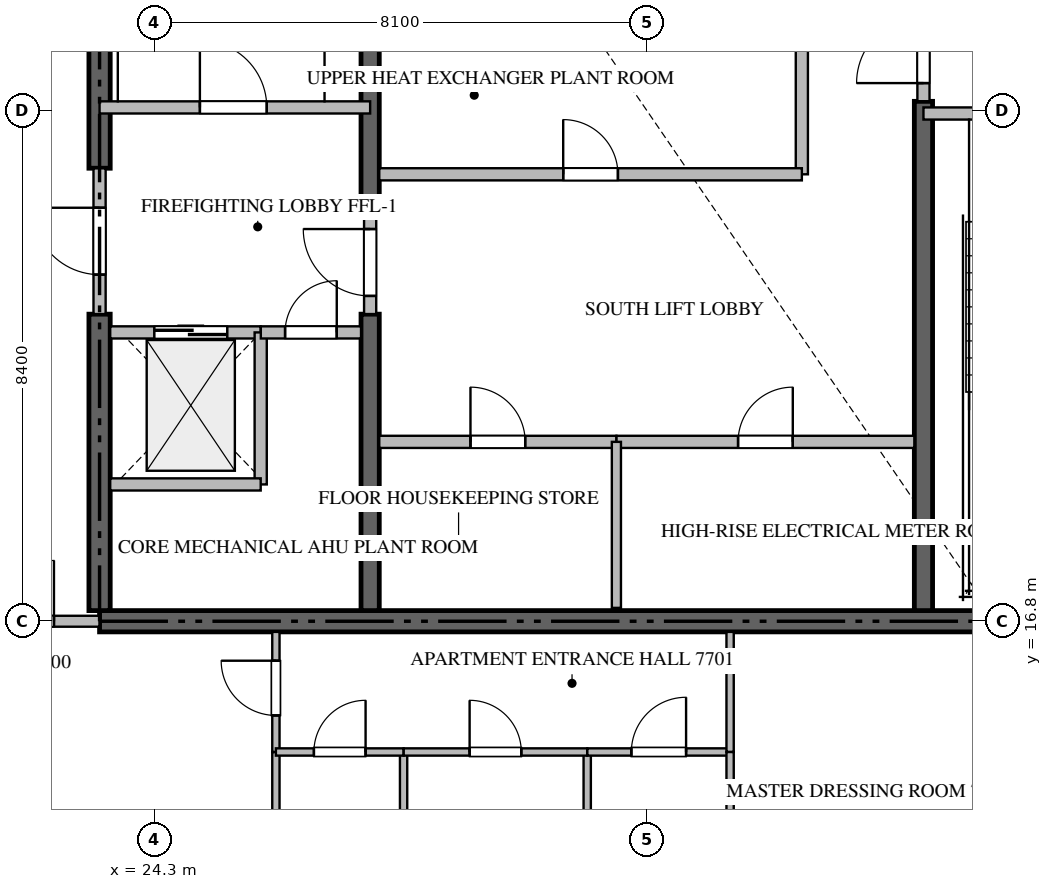
"""IFC4 building model, lengths in metres.
Left out: names, types, materials, properties, quantities, classifications, styles, units other than length and angle.
Written with IfcOpenShell. Run it as: python <this file> out.ifc"""

import sys

from ifc_helpers import new_model, si_unit, direction, frame, frame_2d, origin, place, context, subcontext, project, spatial, rectangle, extrude, source, transform, mapped, element, fill, save


model = new_model("IFC4")
c1 = context("Model", 3, precision=1e-05, world=origin(), true_north=direction((0.0, 1.0)))
c2 = subcontext(c1, "Body", "Model", "MODEL_VIEW")
j1 = project(units=[si_unit("LENGTHUNIT", "METRE"), si_unit("PLANEANGLEUNIT", "RADIAN")], contexts=[c1])
p1 = place(None, origin())
s1 = spatial("IfcSite", under=j1, at=p1, CompositionType="ELEMENT")
p2 = place(p1, origin())
s2 = spatial("IfcBuilding", under=s1, at=p2, CompositionType="ELEMENT")
p3 = place(p2, frame((0.0, 0.0, 309.65)))
s3 = spatial("IfcBuildingStorey", under=s2, at=p3, CompositionType="ELEMENT", Elevation=309.65)
p4 = place(p3, frame((23.4, 16.8, -0.26), z_axis=(0.0, 0.0, 1.0), x_axis=(1.0, 0.0, 0.0)))
e1 = element("IfcWall", 1, at=p4, inside=s3, PredefinedType="SHEAR", context=c2, shape_type="SweptSolid", body=[
    extrude(rectangle(XDim=18.0, YDim=0.35, at=frame_2d((9.0, 0.0))), origin(), (0.0, 0.0, 1.0), 4.048),
])
p5 = place(p3, frame((23.4, 16.975, -0.26), z_axis=(0.0, 0.0, 1.0), x_axis=(0.0, 1.0, 0.0)))
e2 = element("IfcWall", 2, at=p5, inside=s3, PredefinedType="SHEAR", context=c2, shape_type="SweptSolid", body=[
    extrude(rectangle(XDim=4.875, YDim=0.35, at=frame_2d((2.438, 0.0))), origin(), (0.0, 0.0, 1.0), 4.048),
])
p6 = place(p3, frame((23.4, 24.25, -0.26), z_axis=(0.0, 0.0, 1.0), x_axis=(0.0, 1.0, 0.0)))
e3 = element("IfcWall", 3, at=p6, inside=s3, PredefinedType="SHEAR", context=c2, shape_type="SweptSolid", body=[
    extrude(rectangle(XDim=9.175, YDim=0.35, at=frame_2d((4.587, 0.0))), origin(), (0.0, 0.0, 1.0), 4.048),
])
p7 = place(p3, frame((27.85, 16.975, -0.26), z_axis=(0.0, 0.0, 1.0), x_axis=(0.0, 1.0, 0.0)))
e4 = element("IfcWall", 4, at=p7, inside=s3, PredefinedType="SHEAR", context=c2, shape_type="SweptSolid", body=[
    extrude(rectangle(XDim=4.875, YDim=0.3, at=frame_2d((2.438, 0.0))), origin(), (0.0, 0.0, 1.0), 4.048),
])
p8 = place(p3, frame((27.85, 23.55, -0.26), z_axis=(0.0, 0.0, 1.0), x_axis=(0.0, 1.0, 0.0)))
e5 = element("IfcWall", 5, at=p8, inside=s3, PredefinedType="SHEAR", context=c2, shape_type="SweptSolid", body=[
    extrude(rectangle(XDim=9.875, YDim=0.3, at=frame_2d((4.938, 0.0))), origin(), (0.0, 0.0, 1.0), 4.048),
])
p9 = place(p3, frame((36.95, 16.975, -0.26), z_axis=(0.0, 0.0, 1.0), x_axis=(0.0, 1.0, 0.0)))
e6 = element("IfcWall", 6, at=p9, inside=s3, PredefinedType="SHEAR", context=c2, shape_type="SweptSolid", body=[
    extrude(rectangle(XDim=8.375, YDim=0.3, at=frame_2d((4.188, 0.0))), origin(), (0.0, 0.0, 1.0), 4.048),
])
p10 = place(p3, frame((23.4, 25.25, 0.0), z_axis=(0.0, 0.0, 1.0), x_axis=(1.0, 0.0, 0.0)))
e7 = element("IfcWall", 7, at=p10, inside=s3, PredefinedType="STANDARD", context=c2, shape_type="SweptSolid", body=[
    extrude(rectangle(XDim=4.45, YDim=0.2, at=frame_2d((2.225, 0.0))), origin(), (0.0, 0.0, 1.0), 3.79),
])
p11 = place(p10, frame((1.65, 0.0, 0.0)))
e8 = element("IfcOpeningElement", 8, at=p11, cuts=e7, PredefinedType="OPENING", context=c2, shape_type="SweptSolid", body=[
    extrude(rectangle(XDim=1.1, YDim=2.15, at=frame_2d((0.55, 1.075))), frame((0.0, 0.11, 0.0), z_axis=(0.0, -1.0, 0.0), x_axis=(1.0, 0.0, 0.0)), (0.0, 0.0, 1.0), 0.22),
])
p12 = place(p3, frame((36.95, 25.15, 0.0), z_axis=(0.0, 0.0, 1.0), x_axis=(1.0, 0.0, 0.0)))
e9 = element("IfcWall", 9, at=p12, inside=s3, PredefinedType="STANDARD", context=c2, shape_type="SweptSolid", body=[
    extrude(rectangle(XDim=4.45, YDim=0.2, at=frame_2d((2.225, 0.0))), origin(), (0.0, 0.0, 1.0), 3.79),
])
p13 = place(p12, frame((1.65, 0.0, 0.0)))
e10 = element("IfcOpeningElement", 10, at=p13, cuts=e9, PredefinedType="OPENING", context=c2, shape_type="SweptSolid", body=[
    extrude(rectangle(XDim=1.1, YDim=2.15, at=frame_2d((0.55, 1.075))), frame((0.0, 0.11, 0.0), z_axis=(0.0, -1.0, 0.0), x_axis=(1.0, 0.0, 0.0)), (0.0, 0.0, 1.0), 0.22),
])
p14 = place(p3, frame((23.575, 21.55, 0.0), z_axis=(0.0, 0.0, 1.0), x_axis=(1.0, 0.0, 0.0)))
e11 = element("IfcWall", 11, at=p14, inside=s3, PredefinedType="STANDARD", context=c2, shape_type="SweptSolid", body=[
    extrude(rectangle(XDim=2.475, YDim=0.2, at=frame_2d((1.238, 0.0))), origin(), (0.0, 0.0, 1.0), 3.79),
])
p15 = place(p14, frame((0.725, 0.0, 0.0)))
e12 = element("IfcOpeningElement", 12, at=p15, cuts=e11, PredefinedType="OPENING", context=c2, shape_type="SweptSolid", body=[
    extrude(rectangle(XDim=1.2, YDim=2.2, at=frame_2d((0.6, 1.1))), frame((0.0, 0.11, 0.0), z_axis=(0.0, -1.0, 0.0), x_axis=(1.0, 0.0, 0.0)), (0.0, 0.0, 1.0), 0.22),
])
p16 = place(p3, frame((26.05, 19.05, 0.0), z_axis=(0.0, 0.0, 1.0), x_axis=(0.0, 1.0, 0.0)))
e13 = element("IfcWall", 13, at=p16, inside=s3, PredefinedType="STANDARD", context=c2, shape_type="SweptSolid", body=[
    extrude(rectangle(XDim=2.5, YDim=0.2, at=frame_2d((1.25, 0.0))), origin(), (0.0, 0.0, 1.0), 3.79),
])
p17 = place(p3, frame((23.575, 19.05, 0.0), z_axis=(0.0, 0.0, 1.0), x_axis=(1.0, 0.0, 0.0)))
e14 = element("IfcWall", 14, at=p17, inside=s3, PredefinedType="STANDARD", context=c2, shape_type="SweptSolid", body=[
    extrude(rectangle(XDim=2.475, YDim=0.2, at=frame_2d((1.238, 0.0))), origin(), (0.0, 0.0, 1.0), 3.79),
])
p18 = place(p3, frame((26.052, 21.55, 0.0), z_axis=(0.0, 0.0, 1.0), x_axis=(1.0, 0.0, 0.0)))
e15 = element("IfcWall", 15, at=p18, inside=s3, PredefinedType="STANDARD", context=c2, shape_type="SweptSolid", body=[
    extrude(rectangle(XDim=1.648, YDim=0.2, at=frame_2d((0.824, 0.0))), origin(), (0.0, 0.0, 1.0), 3.79),
])
p19 = place(p18, frame((0.399, 0.0, 0.0)))
e16 = element("IfcOpeningElement", 16, at=p19, cuts=e15, PredefinedType="OPENING", context=c2, shape_type="SweptSolid", body=[
    extrude(rectangle(XDim=0.85, YDim=2.1, at=frame_2d((0.425, 1.05))), frame((0.0, 0.11, 0.0), z_axis=(0.0, -1.0, 0.0), x_axis=(1.0, 0.0, 0.0)), (0.0, 0.0, 1.0), 0.22),
])
p20 = place(p3, frame((23.4, 21.852, 0.0), z_axis=(0.0, 0.0, 1.0), x_axis=(0.0, 1.0, 0.0)))
e17 = element("IfcWall", 17, at=p20, inside=s3, PredefinedType="STANDARD", context=c2, shape_type="SweptSolid", body=[
    extrude(rectangle(XDim=2.396, YDim=0.2, at=frame_2d((1.198, 0.0))), origin(), (0.0, 0.0, 1.0), 3.79),
])
p21 = place(p20, frame((0.648, 0.0, 0.0)))
e18 = element("IfcOpeningElement", 18, at=p21, cuts=e17, PredefinedType="OPENING", context=c2, shape_type="SweptSolid", body=[
    extrude(rectangle(XDim=1.1, YDim=2.15, at=frame_2d((0.55, 1.075))), frame((0.0, 0.11, 0.0), z_axis=(0.0, -1.0, 0.0), x_axis=(1.0, 0.0, 0.0)), (0.0, 0.0, 1.0), 0.22),
])
p22 = place(p3, frame((27.85, 21.852, 0.0), z_axis=(0.0, 0.0, 1.0), x_axis=(0.0, 1.0, 0.0)))
e19 = element("IfcWall", 19, at=p22, inside=s3, PredefinedType="STANDARD", context=c2, shape_type="SweptSolid", body=[
    extrude(rectangle(XDim=1.696, YDim=0.2, at=frame_2d((0.848, 0.0))), origin(), (0.0, 0.0, 1.0), 3.79),
])
p23 = place(p22, frame((0.298, 0.0, 0.0)))
e20 = element("IfcOpeningElement", 20, at=p23, cuts=e19, PredefinedType="OPENING", context=c2, shape_type="SweptSolid", body=[
    extrude(rectangle(XDim=1.1, YDim=2.15, at=frame_2d((0.55, 1.075))), frame((0.0, 0.11, 0.0), z_axis=(0.0, -1.0, 0.0), x_axis=(1.0, 0.0, 0.0)), (0.0, 0.0, 1.0), 0.22),
])
p24 = place(p3, frame((36.95, 25.352, 0.0), z_axis=(0.0, 0.0, 1.0), x_axis=(0.0, 1.0, 0.0)))
e21 = element("IfcWall", 21, at=p24, inside=s3, PredefinedType="STANDARD", context=c2, shape_type="SweptSolid", body=[
    extrude(rectangle(XDim=1.696, YDim=0.2, at=frame_2d((0.848, 0.0))), origin(), (0.0, 0.0, 1.0), 3.79),
])
p25 = place(p24, frame((0.298, 0.0, 0.0)))
e22 = element("IfcOpeningElement", 22, at=p25, cuts=e21, PredefinedType="OPENING", context=c2, shape_type="SweptSolid", body=[
    extrude(rectangle(XDim=1.1, YDim=2.15, at=frame_2d((0.55, 1.075))), frame((0.0, 0.11, 0.0), z_axis=(0.0, -1.0, 0.0), x_axis=(1.0, 0.0, 0.0)), (0.0, 0.0, 1.0), 0.22),
])
p26 = place(p3, frame((28.0, 19.75, 0.0), z_axis=(0.0, 0.0, 1.0), x_axis=(1.0, 0.0, 0.0)))
e23 = element("IfcWall", 23, at=p26, inside=s3, PredefinedType="STANDARD", context=c2, shape_type="SweptSolid", body=[
    extrude(rectangle(XDim=3.9, YDim=0.2, at=frame_2d((1.95, 0.0))), origin(), (0.0, 0.0, 1.0), 3.79),
])
p27 = place(p26, frame((1.5, 0.0, 0.0)))
e24 = element("IfcOpeningElement", 24, at=p27, cuts=e23, PredefinedType="OPENING", context=c2, shape_type="SweptSolid", body=[
    extrude(rectangle(XDim=0.9, YDim=2.1, at=frame_2d((0.45, 1.05))), frame((0.0, 0.11, 0.0), z_axis=(0.0, -1.0, 0.0), x_axis=(1.0, 0.0, 0.0)), (0.0, 0.0, 1.0), 0.22),
])
p28 = place(p3, frame((31.902, 19.75, 0.0), z_axis=(0.0, 0.0, 1.0), x_axis=(1.0, 0.0, 0.0)))
e25 = element("IfcWall", 25, at=p28, inside=s3, PredefinedType="STANDARD", context=c2, shape_type="SweptSolid", body=[
    extrude(rectangle(XDim=4.898, YDim=0.2, at=frame_2d((2.449, 0.0))), origin(), (0.0, 0.0, 1.0), 3.79),
])
p29 = place(p28, frame((1.999, 0.0, 0.0)))
e26 = element("IfcOpeningElement", 26, at=p29, cuts=e25, PredefinedType="OPENING", context=c2, shape_type="SweptSolid", body=[
    extrude(rectangle(XDim=0.9, YDim=2.1, at=frame_2d((0.45, 1.05))), frame((0.0, 0.11, 0.0), z_axis=(0.0, -1.0, 0.0), x_axis=(1.0, 0.0, 0.0)), (0.0, 0.0, 1.0), 0.22),
])
p30 = place(p3, frame((31.9, 17.02, 0.0), z_axis=(0.0, 0.0, 1.0), x_axis=(0.0, 1.0, 0.0)))
e27 = element("IfcWall", 27, at=p30, inside=s3, PredefinedType="PARTITIONING", context=c2, shape_type="SweptSolid", body=[
    extrude(rectangle(XDim=2.73, YDim=0.15, at=frame_2d((1.365, 0.0))), origin(), (0.0, 0.0, 1.0), 3.79),
])
p31 = place(p3, frame((34.95, 24.15, 0.0), z_axis=(0.0, 0.0, 1.0), x_axis=(0.0, 1.0, 0.0)))
e28 = element("IfcWall", 28, at=p31, inside=s3, PredefinedType="STANDARD", context=c2, shape_type="SweptSolid", body=[
    extrude(rectangle(XDim=2.8, YDim=0.2, at=frame_2d((1.4, 0.0))), origin(), (0.0, 0.0, 1.0), 3.79),
])
p32 = place(p3, frame((28.0, 24.15, 0.0), z_axis=(0.0, 0.0, 1.0), x_axis=(1.0, 0.0, 0.0)))
e29 = element("IfcWall", 29, at=p32, inside=s3, PredefinedType="STANDARD", context=c2, shape_type="SweptSolid", body=[
    extrude(rectangle(XDim=6.95, YDim=0.2, at=frame_2d((3.475, 0.0))), origin(), (0.0, 0.0, 1.0), 3.79),
])
p33 = place(p32, frame((3.025, 0.0, 0.0)))
e30 = element("IfcOpeningElement", 30, at=p33, cuts=e29, PredefinedType="OPENING", context=c2, shape_type="SweptSolid", body=[
    extrude(rectangle(XDim=0.9, YDim=2.1, at=frame_2d((0.45, 1.05))), frame((0.0, 0.11, 0.0), z_axis=(0.0, -1.0, 0.0), x_axis=(1.0, 0.0, 0.0)), (0.0, 0.0, 1.0), 0.22),
])
p34 = place(p3, frame((20.902, 16.8, 0.0), z_axis=(0.0, 0.0, 1.0), x_axis=(1.0, 0.0, 0.0)))
e31 = element("IfcWall", 31, at=p34, inside=s3, PredefinedType="PARTITIONING", context=c2, shape_type="SweptSolid", body=[
    extrude(rectangle(XDim=2.496, YDim=0.18, at=frame_2d((1.248, 0.0))), origin(), (0.0, 0.0, 1.0), 3.79),
])
p35 = place(p34, frame((0.748, 0.0, 0.0)))
e32 = element("IfcOpeningElement", 32, at=p35, cuts=e31, PredefinedType="OPENING", context=c2, shape_type="SweptSolid", body=[
    extrude(rectangle(XDim=1.0, YDim=2.15, at=frame_2d((0.5, 1.075))), frame((0.0, 0.1, 0.0), z_axis=(0.0, -1.0, 0.0), x_axis=(1.0, 0.0, 0.0)), (0.0, 0.0, 1.0), 0.2),
])
p36 = place(p3, frame((26.3, 14.65, 0.0), z_axis=(0.0, 0.0, 1.0), x_axis=(0.0, 1.0, 0.0)))
e33 = element("IfcWall", 33, at=p36, inside=s3, PredefinedType="PARTITIONING", context=c2, shape_type="SweptSolid", body=[
    extrude(rectangle(XDim=1.975, YDim=0.12, at=frame_2d((0.988, 0.0))), origin(), (0.0, 0.0, 1.0), 3.79),
])
p37 = place(p36, frame((0.601, 0.0, 0.0)))
e34 = element("IfcOpeningElement", 34, at=p37, cuts=e33, PredefinedType="OPENING", context=c2, shape_type="SweptSolid", body=[
    extrude(rectangle(XDim=0.9, YDim=2.1, at=frame_2d((0.45, 1.05))), frame((0.0, 0.07, 0.0), z_axis=(0.0, -1.0, 0.0), x_axis=(1.0, 0.0, 0.0)), (0.0, 0.0, 1.0), 0.14),
])
p38 = place(p3, frame((26.3, 9.097, 0.0), z_axis=(0.0, 0.0, 1.0), x_axis=(0.0, 1.0, 0.0)))
e35 = element("IfcWall", 35, at=p38, inside=s3, PredefinedType="PARTITIONING", context=c2, shape_type="SweptSolid", body=[
    extrude(rectangle(XDim=5.551, YDim=0.12, at=frame_2d((2.775, 0.0))), origin(), (0.0, 0.0, 1.0), 3.79),
])
p39 = place(p3, frame((31.42, 2.495, 0.0), z_axis=(0.0, 0.0, 1.0), x_axis=(0.0, 1.0, 0.0)))
e36 = element("IfcWall", 36, at=p39, inside=s3, PredefinedType="PARTITIONING", context=c2, shape_type="SweptSolid", body=[
    extrude(rectangle(XDim=12.155, YDim=0.12, at=frame_2d((6.077, 0.0))), origin(), (0.0, 0.0, 1.0), 3.79),
])
p40 = place(p3, frame((28.4, 9.095, 0.0), z_axis=(0.0, 0.0, 1.0), x_axis=(0.0, 1.0, 0.0)))
e37 = element("IfcWall", 37, at=p40, inside=s3, PredefinedType="PARTITIONING", context=c2, shape_type="SweptSolid", body=[
    extrude(rectangle(XDim=5.555, YDim=0.12, at=frame_2d((2.777, 0.0))), origin(), (0.0, 0.0, 1.0), 3.79),
])
p41 = place(p3, frame((26.3, 14.65, 0.0), z_axis=(0.0, 0.0, 1.0), x_axis=(1.0, 0.0, 0.0)))
e38 = element("IfcWall", 38, at=p41, inside=s3, PredefinedType="PARTITIONING", context=c2, shape_type="SweptSolid", body=[
    extrude(rectangle(XDim=2.1, YDim=0.12, at=frame_2d((1.05, 0.0))), origin(), (0.0, 0.0, 1.0), 3.79),
])
p42 = place(p41, frame((0.625, 0.0, 0.0)))
e39 = element("IfcOpeningElement", 39, at=p42, cuts=e38, PredefinedType="OPENING", context=c2, shape_type="SweptSolid", body=[
    extrude(rectangle(XDim=0.85, YDim=2.1, at=frame_2d((0.425, 1.05))), frame((0.0, 0.07, 0.0), z_axis=(0.0, -1.0, 0.0), x_axis=(1.0, 0.0, 0.0)), (0.0, 0.0, 1.0), 0.14),
])
p43 = place(p3, frame((28.402, 14.65, 0.0), z_axis=(0.0, 0.0, 1.0), x_axis=(1.0, 0.0, 0.0)))
e40 = element("IfcWall", 40, at=p43, inside=s3, PredefinedType="PARTITIONING", context=c2, shape_type="SweptSolid", body=[
    extrude(rectangle(XDim=3.018, YDim=0.12, at=frame_2d((1.509, 0.0))), origin(), (0.0, 0.0, 1.0), 3.79),
])
p44 = place(p43, frame((1.084, 0.0, 0.0)))
e41 = element("IfcOpeningElement", 41, at=p44, cuts=e40, PredefinedType="OPENING", context=c2, shape_type="SweptSolid", body=[
    extrude(rectangle(XDim=0.85, YDim=2.1, at=frame_2d((0.425, 1.05))), frame((0.0, 0.07, 0.0), z_axis=(0.0, -1.0, 0.0), x_axis=(1.0, 0.0, 0.0)), (0.0, 0.0, 1.0), 0.14),
])
p45 = place(p3, frame((31.422, 14.65, 0.0), z_axis=(0.0, 0.0, 1.0), x_axis=(1.0, 0.0, 0.0)))
e42 = element("IfcWall", 42, at=p45, inside=s3, PredefinedType="PARTITIONING", context=c2, shape_type="SweptSolid", body=[
    extrude(rectangle(XDim=2.348, YDim=0.12, at=frame_2d((1.174, 0.0))), origin(), (0.0, 0.0, 1.0), 3.79),
])
p46 = place(p45, frame((0.724, 0.0, 0.0)))
e43 = element("IfcOpeningElement", 43, at=p46, cuts=e42, PredefinedType="OPENING", context=c2, shape_type="SweptSolid", body=[
    extrude(rectangle(XDim=0.9, YDim=2.1, at=frame_2d((0.45, 1.05))), frame((0.0, 0.07, 0.0), z_axis=(0.0, -1.0, 0.0), x_axis=(1.0, 0.0, 0.0)), (0.0, 0.0, 1.0), 0.14),
])
p47 = place(p3, frame((33.77, 9.75, 0.0), z_axis=(0.0, 0.0, 1.0), x_axis=(0.0, 1.0, 0.0)))
e44 = element("IfcWall", 44, at=p47, inside=s3, PredefinedType="PARTITIONING", context=c2, shape_type="SweptSolid", body=[
    extrude(rectangle(XDim=4.9, YDim=0.12, at=frame_2d((2.45, 0.0))), origin(), (0.0, 0.0, 1.0), 3.79),
])
p48 = place(p47, frame((2.025, 0.0, 0.0)))
e45 = element("IfcOpeningElement", 45, at=p48, cuts=e44, PredefinedType="OPENING", context=c2, shape_type="SweptSolid", body=[
    extrude(rectangle(XDim=0.85, YDim=2.1, at=frame_2d((0.425, 1.05))), frame((0.0, 0.07, 0.0), z_axis=(0.0, -1.0, 0.0), x_axis=(1.0, 0.0, 0.0)), (0.0, 0.0, 1.0), 0.14),
])
p49 = place(p3, frame((33.77, 14.652, 0.0), z_axis=(0.0, 0.0, 1.0), x_axis=(0.0, 1.0, 0.0)))
e46 = element("IfcWall", 46, at=p49, inside=s3, PredefinedType="PARTITIONING", context=c2, shape_type="SweptSolid", body=[
    extrude(rectangle(XDim=1.973, YDim=0.12, at=frame_2d((0.986, 0.0))), origin(), (0.0, 0.0, 1.0), 3.79),
])
m1 = source(origin(), c2, "Body", "SweptSolid", [
    extrude(rectangle(XDim=1.1, YDim=2.15, at=frame_2d((0.55, 1.075))), frame((0.0, 0.025, 0.0), z_axis=(0.0, -1.0, 0.0), x_axis=(1.0, 0.0, 0.0)), (0.0, 0.0, 1.0), 0.05),
])
p50 = place(p11, origin())
e47 = element("IfcDoor", 47, at=p50, inside=s3, OperationType="SINGLE_SWING_LEFT", PredefinedType="DOOR", context=c2, shape_type="MappedRepresentation", body=[
    mapped(m1, transform((0.0, 0.0, 0.0), scale=1.0)),
])
fill(e8, e47)
m2 = source(origin(), c2, "Body", "SweptSolid", [
    extrude(rectangle(XDim=1.2, YDim=2.2, at=frame_2d((0.6, 1.1))), frame((0.0, 0.025, 0.0), z_axis=(0.0, -1.0, 0.0), x_axis=(1.0, 0.0, 0.0)), (0.0, 0.0, 1.0), 0.05),
])
p51 = place(p15, origin())
e48 = element("IfcDoor", 48, at=p51, inside=s3, OperationType="DOUBLE_DOOR_SLIDING", PredefinedType="DOOR", context=c2, shape_type="MappedRepresentation", body=[
    mapped(m2, transform((0.0, 0.0, 0.0), scale=1.0)),
])
fill(e12, e48)
m3 = source(origin(), c2, "Body", "SweptSolid", [
    extrude(rectangle(XDim=0.85, YDim=2.1, at=frame_2d((0.425, 1.05))), frame((0.0, 0.025, 0.0), z_axis=(0.0, -1.0, 0.0), x_axis=(1.0, 0.0, 0.0)), (0.0, 0.0, 1.0), 0.05),
])
p52 = place(p19, origin())
e49 = element("IfcDoor", 49, at=p52, inside=s3, OperationType="SINGLE_SWING_RIGHT", PredefinedType="DOOR", context=c2, shape_type="MappedRepresentation", body=[
    mapped(m3, transform((0.0, 0.0, 0.0), scale=1.0)),
])
fill(e16, e49)
p53 = place(p21, origin())
e50 = element("IfcDoor", 50, at=p53, inside=s3, OperationType="SINGLE_SWING_RIGHT", PredefinedType="DOOR", context=c2, shape_type="MappedRepresentation", body=[
    mapped(m1, transform((0.0, 0.0, 0.0), scale=1.0)),
])
fill(e18, e50)
p54 = place(p23, origin())
e51 = element("IfcDoor", 51, at=p54, inside=s3, OperationType="SINGLE_SWING_RIGHT", PredefinedType="DOOR", context=c2, shape_type="MappedRepresentation", body=[
    mapped(m1, transform((0.0, 0.0, 0.0), scale=1.0)),
])
fill(e20, e51)
p55 = place(p25, origin())
e52 = element("IfcDoor", 52, at=p55, inside=s3, OperationType="SINGLE_SWING_LEFT", PredefinedType="DOOR", context=c2, shape_type="MappedRepresentation", body=[
    mapped(m1, transform((0.0, 0.0, 0.0), scale=1.0)),
])
fill(e22, e52)
m4 = source(origin(), c2, "Body", "SweptSolid", [
    extrude(rectangle(XDim=0.9, YDim=2.1, at=frame_2d((0.45, 1.05))), frame((0.0, 0.025, 0.0), z_axis=(0.0, -1.0, 0.0), x_axis=(1.0, 0.0, 0.0)), (0.0, 0.0, 1.0), 0.05),
])
p56 = place(p27, origin())
e53 = element("IfcDoor", 53, at=p56, inside=s3, OperationType="SINGLE_SWING_LEFT", PredefinedType="DOOR", context=c2, shape_type="MappedRepresentation", body=[
    mapped(m4, transform((0.0, 0.0, 0.0), scale=1.0)),
])
fill(e24, e53)
p57 = place(p29, origin())
e54 = element("IfcDoor", 54, at=p57, inside=s3, OperationType="SINGLE_SWING_RIGHT", PredefinedType="DOOR", context=c2, shape_type="MappedRepresentation", body=[
    mapped(m4, transform((0.0, 0.0, 0.0), scale=1.0)),
])
fill(e26, e54)
p58 = place(p33, origin())
e55 = element("IfcDoor", 55, at=p58, inside=s3, OperationType="SINGLE_SWING_LEFT", PredefinedType="DOOR", context=c2, shape_type="MappedRepresentation", body=[
    mapped(m4, transform((0.0, 0.0, 0.0), scale=1.0)),
])
fill(e30, e55)
m5 = source(origin(), c2, "Body", "SweptSolid", [
    extrude(rectangle(XDim=1.0, YDim=2.15, at=frame_2d((0.5, 1.075))), frame((0.0, 0.025, 0.0), z_axis=(0.0, -1.0, 0.0), x_axis=(1.0, 0.0, 0.0)), (0.0, 0.0, 1.0), 0.05),
])
p59 = place(p35, origin())
e56 = element("IfcDoor", 56, at=p59, inside=s3, OperationType="SINGLE_SWING_RIGHT", PredefinedType="DOOR", context=c2, shape_type="MappedRepresentation", body=[
    mapped(m5, transform((0.0, 0.0, 0.0), scale=1.0)),
])
fill(e32, e56)
p60 = place(p37, origin())
e57 = element("IfcDoor", 57, at=p60, inside=s3, OperationType="SINGLE_SWING_RIGHT", PredefinedType="DOOR", context=c2, shape_type="MappedRepresentation", body=[
    mapped(m4, transform((0.0, 0.0, 0.0), scale=1.0)),
])
fill(e34, e57)
p61 = place(p42, origin())
e58 = element("IfcDoor", 58, at=p61, inside=s3, OperationType="SINGLE_SWING_RIGHT", PredefinedType="DOOR", context=c2, shape_type="MappedRepresentation", body=[
    mapped(m3, transform((0.0, 0.0, 0.0), scale=1.0)),
])
fill(e39, e58)
p62 = place(p44, origin())
e59 = element("IfcDoor", 59, at=p62, inside=s3, OperationType="SINGLE_SWING_LEFT", PredefinedType="DOOR", context=c2, shape_type="MappedRepresentation", body=[
    mapped(m3, transform((0.0, 0.0, 0.0), scale=1.0)),
])
fill(e41, e59)
p63 = place(p46, origin())
e60 = element("IfcDoor", 60, at=p63, inside=s3, OperationType="SINGLE_SWING_RIGHT", PredefinedType="DOOR", context=c2, shape_type="MappedRepresentation", body=[
    mapped(m4, transform((0.0, 0.0, 0.0), scale=1.0)),
])
fill(e43, e60)
save(model, sys.argv[1])
